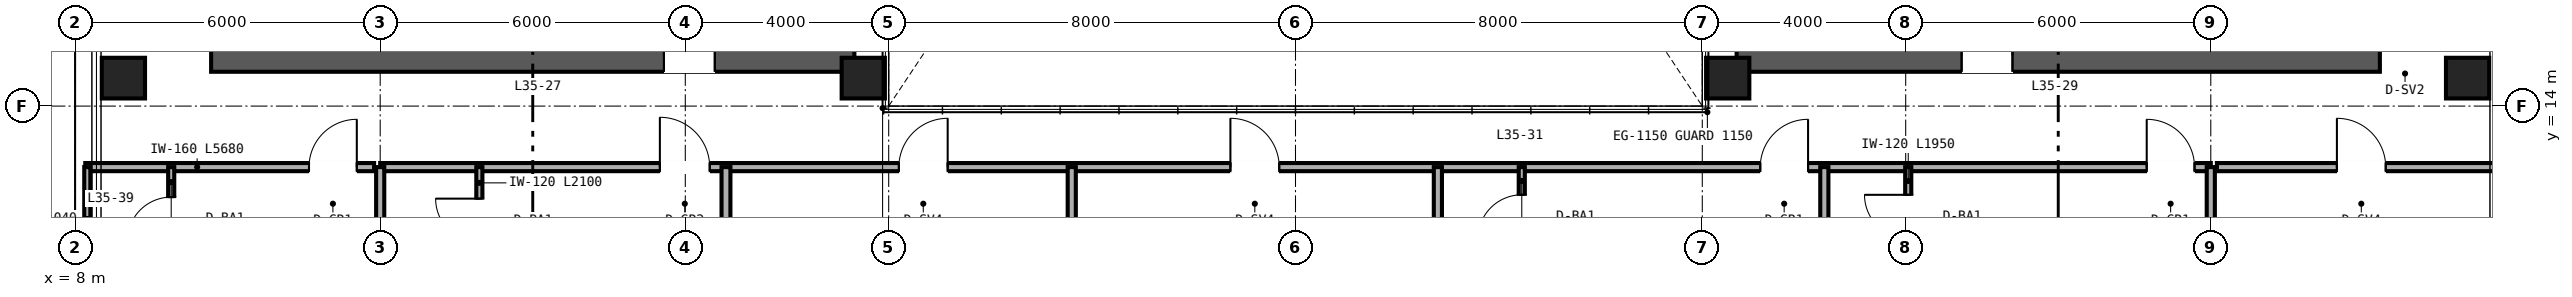
"""IFC4 building model, lengths in metres.
Left out: names, types, materials, properties, quantities, classifications, styles, units other than length and angle.
Written with IfcOpenShell. Run it as: python <this file> out.ifc"""

import sys

from ifc_helpers import new_model, si_unit, direction, frame, frame_2d, origin, origin_2d, place, context, subcontext, project, spatial, rectangle, hollow_rectangle, extrude, source, transform, mapped, element, fill, save


model = new_model("IFC4")
c1 = context("Model", 3, precision=1e-05, world=origin(), true_north=direction((0.0, 1.0)))
c2 = subcontext(c1, "Body", "Model", "MODEL_VIEW")
j1 = project(units=[si_unit("LENGTHUNIT", "METRE"), si_unit("PLANEANGLEUNIT", "RADIAN")], contexts=[c1])
p1 = place(None, origin())
s1 = spatial("IfcSite", under=j1, at=p1, CompositionType="ELEMENT")
p2 = place(p1, origin())
s2 = spatial("IfcBuilding", under=s1, at=p2, CompositionType="ELEMENT")
p3 = place(p2, frame((0.0, 0.0, 140.4)))
s3 = spatial("IfcBuildingStorey", under=s2, at=p3, CompositionType="ELEMENT", Elevation=140.4)
p4 = place(p3, frame((10.675, 15.0, 0.0), z_axis=(0.0, 0.0, 1.0), x_axis=(1.0, 0.0, 0.0)))
e1 = element("IfcWall", 1, at=p4, inside=s3, PredefinedType="SHEAR", context=c2, shape_type="SweptSolid", body=[
    extrude(rectangle(XDim=12.65, YDim=0.65, at=frame_2d((6.325, 0.0))), origin(), (0.0, 0.0, 1.0), 3.36),
])
p5 = place(p4, frame((8.905, 0.0, 0.0)))
e2 = element("IfcOpeningElement", 2, at=p5, cuts=e1, PredefinedType="OPENING", context=c2, shape_type="SweptSolid", body=[
    extrude(rectangle(XDim=1.0, YDim=2.15, at=frame_2d((0.5, 1.075))), frame((0.0, 0.335, 0.0), z_axis=(0.0, -1.0, 0.0), x_axis=(1.0, 0.0, 0.0)), (0.0, 0.0, 1.0), 0.67),
])
p6 = place(p3, frame((40.675, 15.0, 0.0), z_axis=(0.0, 0.0, 1.0), x_axis=(1.0, 0.0, 0.0)))
e3 = element("IfcWall", 3, at=p6, inside=s3, PredefinedType="SHEAR", context=c2, shape_type="SweptSolid", body=[
    extrude(rectangle(XDim=12.65, YDim=0.65, at=frame_2d((6.325, 0.0))), origin(), (0.0, 0.0, 1.0), 3.36),
])
p7 = place(p6, frame((4.425, 0.0, 0.0)))
e4 = element("IfcOpeningElement", 4, at=p7, cuts=e3, PredefinedType="OPENING", context=c2, shape_type="SweptSolid", body=[
    extrude(rectangle(XDim=1.0, YDim=2.15, at=frame_2d((0.5, 1.075))), frame((0.0, 0.335, 0.0), z_axis=(0.0, -1.0, 0.0), x_axis=(1.0, 0.0, 0.0)), (0.0, 0.0, 1.0), 0.67),
])
m1 = source(origin(), c2, "Body", "SweptSolid", [
    extrude(hollow_rectangle(XDim=0.85, YDim=0.8, WallThickness=0.032, at=origin_2d()), origin(), (0.0, 0.0, 1.0), 3.36),
])
for number, where, z_axis, x_axis in (
    (5, (8.95, 14.55, 0.0), (0.0, 0.0, 1.0), (1.0, 0.0, 0.0)),
    (6, (23.5, 14.55, 0.0), (0.0, 0.0, 1.0), (1.0, 0.0, 0.0)),
    (7, (40.5, 14.55, 0.0), (0.0, 0.0, 1.0), (1.0, 0.0, 0.0)),
    (8, (55.05, 14.55, 0.0), (0.0, 0.0, 1.0), (1.0, 0.0, 0.0)),
):
    element("IfcColumn", number, at=place(p3, frame(where, z_axis=z_axis, x_axis=x_axis)), inside=s3, PredefinedType="COLUMN", context=c2, shape_type="MappedRepresentation", body=[
        mapped(m1, transform((0.0, 0.0, 0.0), scale=1.0)),
    ])
p8 = place(p3, frame((8.2, 12.8, 0.0), z_axis=(0.0, 0.0, 1.0), x_axis=(1.0, 0.0, 0.0)))
e9 = element("IfcWall", 9, at=p8, inside=s3, PredefinedType="PARTITIONING", context=c2, shape_type="SweptSolid", body=[
    extrude(rectangle(XDim=5.68, YDim=0.16, at=frame_2d((2.84, 0.0))), origin(), (0.0, 0.0, 1.0), 3.36),
])
p9 = place(p8, frame((4.4, 0.0, 0.0)))
e10 = element("IfcOpeningElement", 10, at=p9, cuts=e9, PredefinedType="OPENING", context=c2, shape_type="SweptSolid", body=[
    extrude(rectangle(XDim=0.94, YDim=2.15, at=frame_2d((0.47, 1.075))), frame((0.0, 0.09, 0.0), z_axis=(0.0, -1.0, 0.0), x_axis=(1.0, 0.0, 0.0)), (0.0, 0.0, 1.0), 0.18),
])
p10 = place(p3, frame((9.89, 10.76, 0.0), z_axis=(0.0, 0.0, 1.0), x_axis=(0.0, 1.0, 0.0)))
e11 = element("IfcWall", 11, at=p10, inside=s3, PredefinedType="PARTITIONING", context=c2, shape_type="SweptSolid", body=[
    extrude(rectangle(XDim=2.04, YDim=0.12, at=frame_2d((1.02, 0.0))), origin(), (0.0, 0.0, 1.0), 3.36),
])
p11 = place(p10, frame((0.59, 0.0, 0.0)))
e12 = element("IfcOpeningElement", 12, at=p11, cuts=e11, PredefinedType="OPENING", context=c2, shape_type="SweptSolid", body=[
    extrude(rectangle(XDim=0.86, YDim=2.1, at=frame_2d((0.43, 1.05))), frame((0.0, 0.07, 0.0), z_axis=(0.0, -1.0, 0.0), x_axis=(1.0, 0.0, 0.0)), (0.0, 0.0, 1.0), 0.14),
])
p12 = place(p3, frame((8.24, 10.76, 0.0), z_axis=(0.0, 0.0, 1.0), x_axis=(0.0, 1.0, 0.0)))
e13 = element("IfcWall", 13, at=p12, inside=s3, PredefinedType="PARTITIONING", context=c2, shape_type="SweptSolid", body=[
    extrude(rectangle(XDim=2.04, YDim=0.12, at=frame_2d((1.02, 0.0))), origin(), (0.0, 0.0, 1.0), 3.36),
])
p13 = place(p3, frame((50.12, 12.8, 0.0), z_axis=(0.0, 0.0, 1.0), x_axis=(1.0, 0.0, 0.0)))
e14 = element("IfcWall", 14, at=p13, inside=s3, PredefinedType="PARTITIONING", context=c2, shape_type="SweptSolid", body=[
    extrude(rectangle(XDim=5.68, YDim=0.16, at=frame_2d((2.84, 0.0))), origin(), (0.0, 0.0, 1.0), 3.36),
])
p14 = place(p13, frame((2.36, 0.0, 0.0)))
e15 = element("IfcOpeningElement", 15, at=p14, cuts=e14, PredefinedType="OPENING", context=c2, shape_type="SweptSolid", body=[
    extrude(rectangle(XDim=0.96, YDim=2.15, at=frame_2d((0.48, 1.075))), frame((0.0, 0.09, 0.0), z_axis=(0.0, -1.0, 0.0), x_axis=(1.0, 0.0, 0.0)), (0.0, 0.0, 1.0), 0.18),
])
p15 = place(p3, frame((14.0, 12.8, 0.0), z_axis=(0.0, 0.0, 1.0), x_axis=(1.0, 0.0, 0.0)))
e16 = element("IfcWall", 16, at=p15, inside=s3, PredefinedType="PARTITIONING", context=c2, shape_type="SweptSolid", body=[
    extrude(rectangle(XDim=36.0, YDim=0.16, at=frame_2d((18.0, 0.0))), origin(), (0.0, 0.0, 1.0), 2.581),
])
p16 = place(p15, frame((5.5, 0.0, 0.0)))
e17 = element("IfcOpeningElement", 17, at=p16, cuts=e16, PredefinedType="OPENING", context=c2, shape_type="SweptSolid", body=[
    extrude(rectangle(XDim=0.98, YDim=2.2, at=frame_2d((0.49, 1.1))), frame((0.0, 0.09, 0.0), z_axis=(0.0, -1.0, 0.0), x_axis=(1.0, 0.0, 0.0)), (0.0, 0.0, 1.0), 0.18),
])
p17 = place(p15, frame((10.2, 0.0, 0.0)))
e18 = element("IfcOpeningElement", 18, at=p17, cuts=e16, PredefinedType="OPENING", context=c2, shape_type="SweptSolid", body=[
    extrude(rectangle(XDim=0.96, YDim=2.15, at=frame_2d((0.48, 1.075))), frame((0.0, 0.09, 0.0), z_axis=(0.0, -1.0, 0.0), x_axis=(1.0, 0.0, 0.0)), (0.0, 0.0, 1.0), 0.18),
])
p18 = place(p15, frame((16.72, 0.0, 0.0)))
e19 = element("IfcOpeningElement", 19, at=p18, cuts=e16, PredefinedType="OPENING", context=c2, shape_type="SweptSolid", body=[
    extrude(rectangle(XDim=0.96, YDim=2.15, at=frame_2d((0.48, 1.075))), frame((0.0, 0.09, 0.0), z_axis=(0.0, -1.0, 0.0), x_axis=(1.0, 0.0, 0.0)), (0.0, 0.0, 1.0), 0.18),
])
p19 = place(p15, frame((27.14, 0.0, 0.0)))
e20 = element("IfcOpeningElement", 20, at=p19, cuts=e16, PredefinedType="OPENING", context=c2, shape_type="SweptSolid", body=[
    extrude(rectangle(XDim=0.94, YDim=2.15, at=frame_2d((0.47, 1.075))), frame((0.0, 0.09, 0.0), z_axis=(0.0, -1.0, 0.0), x_axis=(1.0, 0.0, 0.0)), (0.0, 0.0, 1.0), 0.18),
])
p20 = place(p15, frame((34.74, 0.0, 0.0)))
e21 = element("IfcOpeningElement", 21, at=p20, cuts=e16, PredefinedType="OPENING", context=c2, shape_type="SweptSolid", body=[
    extrude(rectangle(XDim=0.94, YDim=2.15, at=frame_2d((0.47, 1.075))), frame((0.0, 0.09, 0.0), z_axis=(0.0, -1.0, 0.0), x_axis=(1.0, 0.0, 0.0)), (0.0, 0.0, 1.0), 0.18),
])
for number, where, z_axis, x_axis in (
    (22, (14.0, 2.36, 0.0), (0.0, 0.0, 1.0), (0.0, 1.0, 0.0)),
    (23, (50.0, 2.36, 0.0), (0.0, 0.0, 1.0), (0.0, 1.0, 0.0)),
):
    element("IfcWall", number, at=place(p3, frame(where, z_axis=z_axis, x_axis=x_axis)), inside=s3, PredefinedType="PARTITIONING", context=c2, shape_type="SweptSolid", body=[
        extrude(rectangle(XDim=10.44, YDim=0.16, at=frame_2d((5.22, 0.0))), origin(), (0.0, 0.0, 1.0), 2.667),
    ])
p21 = place(p3, frame((20.8, 2.36, 0.0), z_axis=(0.0, 0.0, 1.0), x_axis=(0.0, 1.0, 0.0)))
e24 = element("IfcWall", 24, at=p21, inside=s3, PredefinedType="PARTITIONING", context=c2, shape_type="SweptSolid", body=[
    extrude(rectangle(XDim=10.44, YDim=0.175, at=frame_2d((5.22, 0.0))), origin(), (0.0, 0.0, 1.0), 2.823),
])
p22 = place(p3, frame((15.95, 10.7, 0.0), z_axis=(0.0, 0.0, 1.0), x_axis=(0.0, 1.0, 0.0)))
e25 = element("IfcWall", 25, at=p22, inside=s3, PredefinedType="PARTITIONING", context=c2, shape_type="SweptSolid", body=[
    extrude(rectangle(XDim=2.1, YDim=0.12, at=frame_2d((1.05, 0.0))), origin(), (0.0, 0.0, 1.0), 3.36),
])
p23 = place(p22, frame((0.62, 0.0, 0.0)))
e26 = element("IfcOpeningElement", 26, at=p23, cuts=e25, PredefinedType="OPENING", context=c2, shape_type="SweptSolid", body=[
    extrude(rectangle(XDim=0.86, YDim=2.1, at=frame_2d((0.43, 1.05))), frame((0.0, 0.07, 0.0), z_axis=(0.0, -1.0, 0.0), x_axis=(1.0, 0.0, 0.0)), (0.0, 0.0, 1.0), 0.14),
])
for number, where, z_axis, x_axis in (
    (27, (27.6, 2.36, 0.0), (0.0, 0.0, 1.0), (0.0, 1.0, 0.0)),
    (28, (34.8, 2.36, 0.0), (0.0, 0.0, 1.0), (0.0, 1.0, 0.0)),
):
    element("IfcWall", number, at=place(p3, frame(where, z_axis=z_axis, x_axis=x_axis)), inside=s3, PredefinedType="PARTITIONING", context=c2, shape_type="SweptSolid", body=[
        extrude(rectangle(XDim=10.44, YDim=0.16, at=frame_2d((5.22, 0.0))), origin(), (0.0, 0.0, 1.0), 2.433),
    ])
p24 = place(p3, frame((42.4, 2.36, 0.0), z_axis=(0.0, 0.0, 1.0), x_axis=(0.0, 1.0, 0.0)))
e29 = element("IfcWall", 29, at=p24, inside=s3, PredefinedType="PARTITIONING", context=c2, shape_type="SweptSolid", body=[
    extrude(rectangle(XDim=10.44, YDim=0.16, at=frame_2d((5.22, 0.0))), origin(), (0.0, 0.0, 1.0), 2.823),
])
p25 = place(p3, frame((36.45, 10.85, 0.0), z_axis=(0.0, 0.0, 1.0), x_axis=(0.0, 1.0, 0.0)))
e30 = element("IfcWall", 30, at=p25, inside=s3, PredefinedType="PARTITIONING", context=c2, shape_type="SweptSolid", body=[
    extrude(rectangle(XDim=1.95, YDim=0.12, at=frame_2d((0.975, 0.0))), origin(), (0.0, 0.0, 1.0), 3.36),
])
p26 = place(p25, frame((0.545, 0.0, 0.0)))
e31 = element("IfcOpeningElement", 31, at=p26, cuts=e30, PredefinedType="OPENING", context=c2, shape_type="SweptSolid", body=[
    extrude(rectangle(XDim=0.86, YDim=2.1, at=frame_2d((0.43, 1.05))), frame((0.0, 0.07, 0.0), z_axis=(0.0, -1.0, 0.0), x_axis=(1.0, 0.0, 0.0)), (0.0, 0.0, 1.0), 0.14),
])
p27 = place(p3, frame((44.05, 10.85, 0.0), z_axis=(0.0, 0.0, 1.0), x_axis=(0.0, 1.0, 0.0)))
e32 = element("IfcWall", 32, at=p27, inside=s3, PredefinedType="PARTITIONING", context=c2, shape_type="SweptSolid", body=[
    extrude(rectangle(XDim=1.95, YDim=0.12, at=frame_2d((0.975, 0.0))), origin(), (0.0, 0.0, 1.0), 3.36),
])
p28 = place(p27, frame((0.545, 0.0, 0.0)))
e33 = element("IfcOpeningElement", 33, at=p28, cuts=e32, PredefinedType="OPENING", context=c2, shape_type="SweptSolid", body=[
    extrude(rectangle(XDim=0.86, YDim=2.1, at=frame_2d((0.43, 1.05))), frame((0.0, 0.07, 0.0), z_axis=(0.0, -1.0, 0.0), x_axis=(1.0, 0.0, 0.0)), (0.0, 0.0, 1.0), 0.14),
])
m2 = source(origin(), c2, "Body", "SweptSolid", [
    extrude(rectangle(XDim=1.0, YDim=2.15, at=frame_2d((0.5, 1.075))), frame((0.0, 0.025, 0.0), z_axis=(0.0, -1.0, 0.0), x_axis=(1.0, 0.0, 0.0)), (0.0, 0.0, 1.0), 0.05),
])
p29 = place(p5, origin())
e34 = element("IfcDoor", 34, at=p29, inside=s3, OperationType="SINGLE_SWING_LEFT", PredefinedType="DOOR", context=c2, shape_type="MappedRepresentation", body=[
    mapped(m2, transform((0.0, 0.0, 0.0), scale=1.0)),
])
fill(e2, e34)
p30 = place(p7, origin())
e35 = element("IfcDoor", 35, at=p30, inside=s3, OperationType="SINGLE_SWING_RIGHT", PredefinedType="DOOR", context=c2, shape_type="MappedRepresentation", body=[
    mapped(m2, transform((0.0, 0.0, 0.0), scale=1.0)),
])
fill(e4, e35)
m3 = source(origin(), c2, "Body", "SweptSolid", [
    extrude(rectangle(XDim=0.86, YDim=2.1, at=frame_2d((0.43, 1.05))), frame((0.0, 0.025, 0.0), z_axis=(0.0, -1.0, 0.0), x_axis=(1.0, 0.0, 0.0)), (0.0, 0.0, 1.0), 0.05),
])
p31 = place(p11, origin())
e36 = element("IfcDoor", 36, at=p31, inside=s3, OperationType="SINGLE_SWING_LEFT", PredefinedType="DOOR", context=c2, shape_type="MappedRepresentation", body=[
    mapped(m3, transform((0.0, 0.0, 0.0), scale=1.0)),
])
fill(e12, e36)
m4 = source(origin(), c2, "Body", "SweptSolid", [
    extrude(rectangle(XDim=0.94, YDim=2.15, at=frame_2d((0.47, 1.075))), frame((0.0, 0.025, 0.0), z_axis=(0.0, -1.0, 0.0), x_axis=(1.0, 0.0, 0.0)), (0.0, 0.0, 1.0), 0.05),
])
p32 = place(p9, origin())
e37 = element("IfcDoor", 37, at=p32, inside=s3, OperationType="SINGLE_SWING_RIGHT", PredefinedType="DOOR", context=c2, shape_type="MappedRepresentation", body=[
    mapped(m4, transform((0.0, 0.0, 0.0), scale=1.0)),
])
fill(e10, e37)
m5 = source(origin(), c2, "Body", "SweptSolid", [
    extrude(rectangle(XDim=0.96, YDim=2.15, at=frame_2d((0.48, 1.075))), frame((0.0, 0.025, 0.0), z_axis=(0.0, -1.0, 0.0), x_axis=(1.0, 0.0, 0.0)), (0.0, 0.0, 1.0), 0.05),
])
p33 = place(p14, origin())
e38 = element("IfcDoor", 38, at=p33, inside=s3, OperationType="SINGLE_SWING_LEFT", PredefinedType="DOOR", context=c2, shape_type="MappedRepresentation", body=[
    mapped(m5, transform((0.0, 0.0, 0.0), scale=1.0)),
])
fill(e15, e38)
p34 = place(p23, origin())
e39 = element("IfcDoor", 39, at=p34, inside=s3, OperationType="SINGLE_SWING_RIGHT", PredefinedType="DOOR", context=c2, shape_type="MappedRepresentation", body=[
    mapped(m3, transform((0.0, 0.0, 0.0), scale=1.0)),
])
fill(e26, e39)
p35 = place(p26, origin())
e40 = element("IfcDoor", 40, at=p35, inside=s3, OperationType="SINGLE_SWING_LEFT", PredefinedType="DOOR", context=c2, shape_type="MappedRepresentation", body=[
    mapped(m3, transform((0.0, 0.0, 0.0), scale=1.0)),
])
fill(e31, e40)
p36 = place(p28, origin())
e41 = element("IfcDoor", 41, at=p36, inside=s3, OperationType="SINGLE_SWING_RIGHT", PredefinedType="DOOR", context=c2, shape_type="MappedRepresentation", body=[
    mapped(m3, transform((0.0, 0.0, 0.0), scale=1.0)),
])
fill(e33, e41)
m6 = source(origin(), c2, "Body", "SweptSolid", [
    extrude(rectangle(XDim=0.98, YDim=2.2, at=frame_2d((0.49, 1.1))), frame((0.0, 0.025, 0.0), z_axis=(0.0, -1.0, 0.0), x_axis=(1.0, 0.0, 0.0)), (0.0, 0.0, 1.0), 0.05),
])
p37 = place(p16, origin())
e42 = element("IfcDoor", 42, at=p37, inside=s3, OperationType="SINGLE_SWING_LEFT", PredefinedType="DOOR", context=c2, shape_type="MappedRepresentation", body=[
    mapped(m6, transform((0.0, 0.0, 0.0), scale=1.0)),
])
fill(e17, e42)
p38 = place(p17, origin())
e43 = element("IfcDoor", 43, at=p38, inside=s3, OperationType="SINGLE_SWING_RIGHT", PredefinedType="DOOR", context=c2, shape_type="MappedRepresentation", body=[
    mapped(m5, transform((0.0, 0.0, 0.0), scale=1.0)),
])
fill(e18, e43)
p39 = place(p18, origin())
e44 = element("IfcDoor", 44, at=p39, inside=s3, OperationType="SINGLE_SWING_LEFT", PredefinedType="DOOR", context=c2, shape_type="MappedRepresentation", body=[
    mapped(m5, transform((0.0, 0.0, 0.0), scale=1.0)),
])
fill(e19, e44)
p40 = place(p19, origin())
e45 = element("IfcDoor", 45, at=p40, inside=s3, OperationType="SINGLE_SWING_RIGHT", PredefinedType="DOOR", context=c2, shape_type="MappedRepresentation", body=[
    mapped(m4, transform((0.0, 0.0, 0.0), scale=1.0)),
])
fill(e20, e45)
p41 = place(p20, origin())
e46 = element("IfcDoor", 46, at=p41, inside=s3, OperationType="SINGLE_SWING_LEFT", PredefinedType="DOOR", context=c2, shape_type="MappedRepresentation", body=[
    mapped(m4, transform((0.0, 0.0, 0.0), scale=1.0)),
])
fill(e21, e46)
save(model, sys.argv[1])
